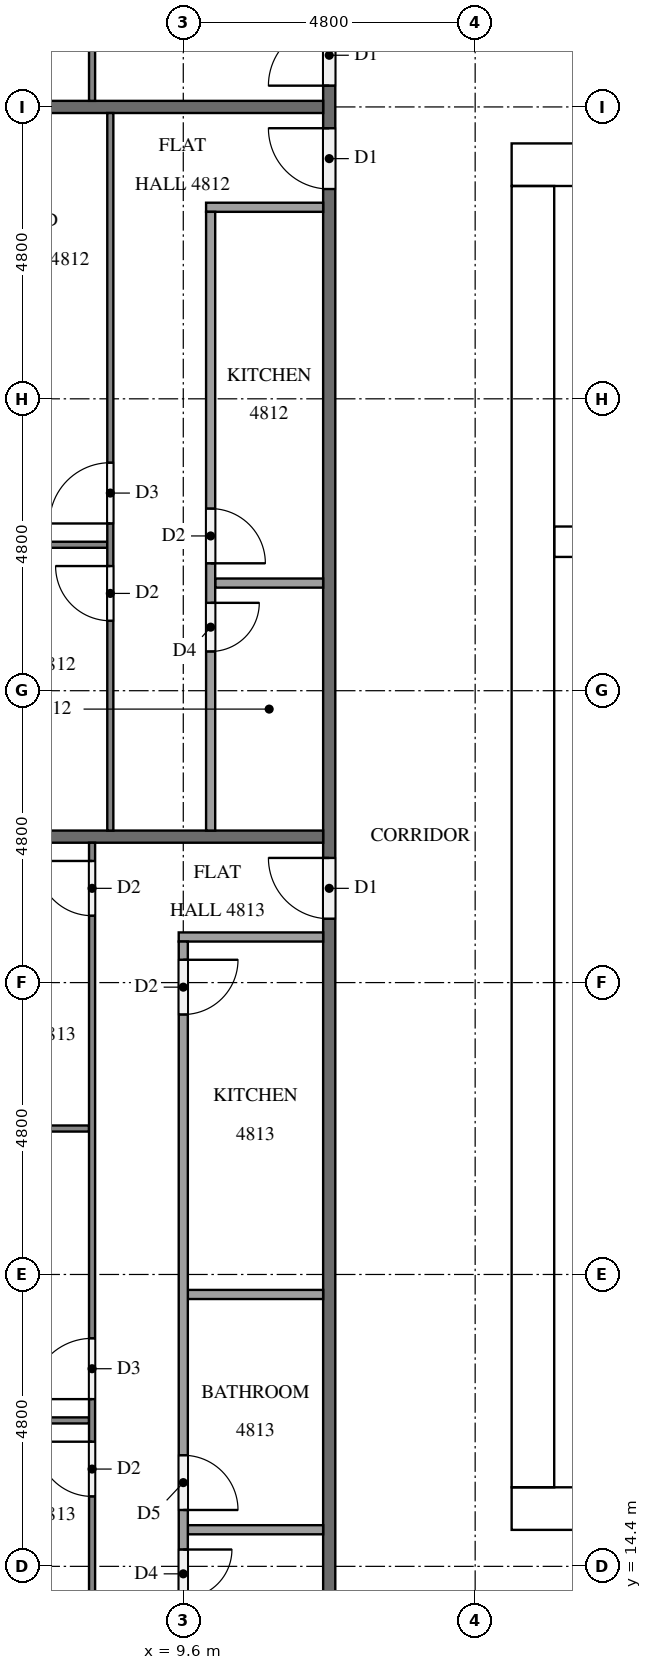
"""IFC4 building model, lengths in metres.
Left out: names, types, materials, properties, quantities, classifications, styles, units other than length and angle.
Written with IfcOpenShell. Run it as: python <this file> out.ifc"""

import sys

from ifc_helpers import new_model, si_unit, direction, frame, frame_2d, origin, place, context, subcontext, project, spatial, rectangle, extrude, element, fill, save


model = new_model("IFC4")
c1 = context("Model", 3, precision=1e-05, world=origin(), true_north=direction((0.0, 1.0)))
c2 = subcontext(c1, "Body", "Model", "MODEL_VIEW")
j1 = project(units=[si_unit("LENGTHUNIT", "METRE"), si_unit("PLANEANGLEUNIT", "RADIAN")], contexts=[c1])
p1 = place(None, origin())
s1 = spatial("IfcSite", under=j1, at=p1, CompositionType="ELEMENT")
p2 = place(p1, origin())
s2 = spatial("IfcBuilding", under=s1, at=p2, CompositionType="ELEMENT")
p3 = place(p2, frame((0.0, 0.0, 185.9)))
s3 = spatial("IfcBuildingStorey", under=s2, at=p3, CompositionType="ELEMENT", Elevation=185.9)
p4 = place(p3, frame((15.0, 15.35, 0.0), z_axis=(0.0, 0.0, 1.0), x_axis=(1.0, 0.0, 0.0)))
e1 = element("IfcWall", 1, at=p4, inside=s3, PredefinedType="SHEAR", context=c2, shape_type="SweptSolid", body=[
    extrude(rectangle(XDim=32.4, YDim=0.7, at=frame_2d((16.2, 0.0))), origin(), (0.0, 0.0, 1.0), 3.2),
])
p5 = place(p4, frame((15.3, 0.0, 0.0)))
e2 = element("IfcOpeningElement", 2, at=p5, cuts=e1, PredefinedType="OPENING", context=c2, shape_type="SweptSolid", body=[
    extrude(rectangle(XDim=1.8, YDim=2.1, at=frame_2d((0.9, 1.05))), frame((0.0, 0.36, 0.0), z_axis=(0.0, -1.0, 0.0), x_axis=(1.0, 0.0, 0.0)), (0.0, 0.0, 1.0), 0.72),
])
p6 = place(p3, frame((15.0, 37.45, 0.0), z_axis=(0.0, 0.0, 1.0), x_axis=(1.0, 0.0, 0.0)))
e3 = element("IfcWall", 3, at=p6, inside=s3, PredefinedType="SHEAR", context=c2, shape_type="SweptSolid", body=[
    extrude(rectangle(XDim=32.4, YDim=0.7, at=frame_2d((16.2, 0.0))), origin(), (0.0, 0.0, 1.0), 3.2),
])
p7 = place(p6, frame((15.3, 0.0, 0.0)))
e4 = element("IfcOpeningElement", 4, at=p7, cuts=e3, PredefinedType="OPENING", context=c2, shape_type="SweptSolid", body=[
    extrude(rectangle(XDim=1.8, YDim=2.1, at=frame_2d((0.9, 1.05))), frame((0.0, 0.36, 0.0), z_axis=(0.0, -1.0, 0.0), x_axis=(1.0, 0.0, 0.0)), (0.0, 0.0, 1.0), 0.72),
])
p8 = place(p6, frame((1.544, 0.0, 0.0)))
e5 = element("IfcOpeningElement", 5, at=p8, cuts=e3, PredefinedType="OPENING", context=c2, shape_type="SweptSolid", body=[
    extrude(rectangle(XDim=1.0, YDim=2.1, at=frame_2d((0.5, 1.05))), frame((0.0, 0.36, 0.0), z_axis=(0.0, -1.0, 0.0), x_axis=(1.0, 0.0, 0.0)), (0.0, 0.0, 1.0), 0.72),
])
p9 = place(p6, frame((5.219, 0.0, 0.0)))
e6 = element("IfcOpeningElement", 6, at=p9, cuts=e3, PredefinedType="OPENING", context=c2, shape_type="SweptSolid", body=[
    extrude(rectangle(XDim=1.0, YDim=2.1, at=frame_2d((0.5, 1.05))), frame((0.0, 0.36, 0.0), z_axis=(0.0, -1.0, 0.0), x_axis=(1.0, 0.0, 0.0)), (0.0, 0.0, 1.0), 0.72),
])
p10 = place(p3, frame((15.35, 15.7, 0.0), z_axis=(0.0, 0.0, 1.0), x_axis=(0.0, 1.0, 0.0)))
e7 = element("IfcWall", 7, at=p10, inside=s3, PredefinedType="SHEAR", context=c2, shape_type="SweptSolid", body=[
    extrude(rectangle(XDim=21.4, YDim=0.7, at=frame_2d((10.7, 0.0))), origin(), (0.0, 0.0, 1.0), 3.2),
])
p11 = place(p10, frame((5.06, 0.0, 0.0)))
e8 = element("IfcOpeningElement", 8, at=p11, cuts=e7, PredefinedType="OPENING", context=c2, shape_type="SweptSolid", body=[
    extrude(rectangle(XDim=1.2, YDim=2.1, at=frame_2d((0.6, 1.05))), frame((0.0, 0.36, 0.0), z_axis=(0.0, -1.0, 0.0), x_axis=(1.0, 0.0, 0.0)), (0.0, 0.0, 1.0), 0.72),
])
p12 = place(p3, frame((15.7, 31.25, 0.0), z_axis=(0.0, 0.0, 1.0), x_axis=(1.0, 0.0, 0.0)))
e9 = element("IfcWall", 9, at=p12, inside=s3, PredefinedType="SHEAR", context=c2, shape_type="SweptSolid", body=[
    extrude(rectangle(XDim=7.15, YDim=0.5, at=frame_2d((3.575, 0.0))), origin(), (0.0, 0.0, 1.0), 3.2),
])
p13 = place(p3, frame((12.0, 12.1, 0.0), z_axis=(0.0, 0.0, 1.0), x_axis=(0.0, 1.0, 0.0)))
e10 = element("IfcWall", 10, at=p13, inside=s3, PredefinedType="PARTITIONING", context=c2, shape_type="SweptSolid", body=[
    extrude(rectangle(XDim=28.6, YDim=0.2, at=frame_2d((14.3, 0.0))), origin(), (0.0, 0.0, 1.0), 3.2),
])
p14 = place(p13, frame((26.65, 0.0, 0.0)))
e11 = element("IfcOpeningElement", 11, at=p14, cuts=e10, PredefinedType="OPENING", context=c2, shape_type="SweptSolid", body=[
    extrude(rectangle(XDim=1.0, YDim=2.1, at=frame_2d((0.5, 1.05))), frame((0.0, 0.11, 0.0), z_axis=(0.0, -1.0, 0.0), x_axis=(1.0, 0.0, 0.0)), (0.0, 0.0, 1.0), 0.22),
])
p15 = place(p13, frame((24.95, 0.0, 0.0)))
e12 = element("IfcOpeningElement", 12, at=p15, cuts=e10, PredefinedType="OPENING", context=c2, shape_type="SweptSolid", body=[
    extrude(rectangle(XDim=1.0, YDim=2.1, at=frame_2d((0.5, 1.05))), frame((0.0, 0.11, 0.0), z_axis=(0.0, -1.0, 0.0), x_axis=(1.0, 0.0, 0.0)), (0.0, 0.0, 1.0), 0.22),
])
p16 = place(p13, frame((12.95, 0.0, 0.0)))
e13 = element("IfcOpeningElement", 13, at=p16, cuts=e10, PredefinedType="OPENING", context=c2, shape_type="SweptSolid", body=[
    extrude(rectangle(XDim=1.0, YDim=2.1, at=frame_2d((0.5, 1.05))), frame((0.0, 0.11, 0.0), z_axis=(0.0, -1.0, 0.0), x_axis=(1.0, 0.0, 0.0)), (0.0, 0.0, 1.0), 0.22),
])
for number, where, z_axis, x_axis in (
    (14, (4.9, 38.4, 0.0), (0.0, 0.0, 1.0), (1.0, 0.0, 0.0)),
    (15, (4.9, 26.4, 0.0), (0.0, 0.0, 1.0), (1.0, 0.0, 0.0)),
):
    element("IfcWall", number, at=place(p3, frame(where, z_axis=z_axis, x_axis=x_axis)), inside=s3, PredefinedType="PARTITIONING", context=c2, shape_type="SweptSolid", body=[
        extrude(rectangle(XDim=7.0, YDim=0.2, at=frame_2d((3.5, 0.0))), origin(), (0.0, 0.0, 1.0), 3.2),
    ])
p17 = place(p3, frame((8.1, 38.5, 0.0), z_axis=(0.0, 0.0, 1.0), x_axis=(0.0, 1.0, 0.0)))
e16 = element("IfcWall", 16, at=p17, inside=s3, PredefinedType="PARTITIONING", context=c2, shape_type="SweptSolid", body=[
    extrude(rectangle(XDim=8.998, YDim=0.1, at=frame_2d((4.499, 0.0))), origin(), (0.0, 0.0, 1.0), 3.2),
])
p18 = place(p17, frame((3.35, 0.0, 0.0)))
e17 = element("IfcOpeningElement", 17, at=p18, cuts=e16, PredefinedType="OPENING", context=c2, shape_type="SweptSolid", body=[
    extrude(rectangle(XDim=1.0, YDim=2.1, at=frame_2d((0.5, 1.05))), frame((0.0, 0.06, 0.0), z_axis=(0.0, -1.0, 0.0), x_axis=(1.0, 0.0, 0.0)), (0.0, 0.0, 1.0), 0.12),
])
p19 = place(p17, frame((5.05, 0.0, 0.0)))
e18 = element("IfcOpeningElement", 18, at=p19, cuts=e16, PredefinedType="OPENING", context=c2, shape_type="SweptSolid", body=[
    extrude(rectangle(XDim=0.9, YDim=2.1, at=frame_2d((0.45, 1.05))), frame((0.0, 0.06, 0.0), z_axis=(0.0, -1.0, 0.0), x_axis=(1.0, 0.0, 0.0)), (0.0, 0.0, 1.0), 0.12),
])
p20 = place(p3, frame((8.35, 31.2, 0.0), z_axis=(0.0, 0.0, 1.0), x_axis=(-1.0, 0.0, 0.0)))
e19 = element("IfcWall", 19, at=p20, inside=s3, PredefinedType="PARTITIONING", context=c2, shape_type="SweptSolid", body=[
    extrude(rectangle(XDim=3.45, YDim=0.1, at=frame_2d((1.725, 0.0))), origin(), (0.0, 0.0, 1.0), 3.2),
])
p21 = place(p3, frame((8.4, 26.5, 0.0), z_axis=(0.0, 0.0, 1.0), x_axis=(0.0, 1.0, 0.0)))
e20 = element("IfcWall", 20, at=p21, inside=s3, PredefinedType="PARTITIONING", context=c2, shape_type="SweptSolid", body=[
    extrude(rectangle(XDim=11.8, YDim=0.1, at=frame_2d((5.9, 0.0))), origin(), (0.0, 0.0, 1.0), 3.2),
])
p22 = place(p21, frame((5.05, 0.0, 0.0)))
e21 = element("IfcOpeningElement", 21, at=p22, cuts=e20, PredefinedType="OPENING", context=c2, shape_type="SweptSolid", body=[
    extrude(rectangle(XDim=1.0, YDim=2.1, at=frame_2d((0.5, 1.05))), frame((0.0, 0.06, 0.0), z_axis=(0.0, -1.0, 0.0), x_axis=(1.0, 0.0, 0.0)), (0.0, 0.0, 1.0), 0.12),
])
p23 = place(p21, frame((3.45, 0.0, 0.0)))
e22 = element("IfcOpeningElement", 22, at=p23, cuts=e20, PredefinedType="OPENING", context=c2, shape_type="SweptSolid", body=[
    extrude(rectangle(XDim=0.9, YDim=2.1, at=frame_2d((0.45, 1.05))), frame((0.0, 0.06, 0.0), z_axis=(0.0, -1.0, 0.0), x_axis=(1.0, 0.0, 0.0)), (0.0, 0.0, 1.0), 0.12),
])
p24 = place(p3, frame((11.9, 30.57, 0.0), z_axis=(0.0, 0.0, 1.0), x_axis=(-1.0, 0.0, 0.0)))
e23 = element("IfcWall", 23, at=p24, inside=s3, PredefinedType="PARTITIONING", context=c2, shape_type="SweptSolid", body=[
    extrude(rectangle(XDim=1.775, YDim=0.15, at=frame_2d((0.887, 0.0))), origin(), (0.0, 0.0, 1.0), 3.2),
])
p25 = place(p3, frame((11.9, 36.75, 0.0), z_axis=(0.0, 0.0, 1.0), x_axis=(-1.0, 0.0, 0.0)))
e24 = element("IfcWall", 24, at=p25, inside=s3, PredefinedType="PARTITIONING", context=c2, shape_type="SweptSolid", body=[
    extrude(rectangle(XDim=1.925, YDim=0.15, at=frame_2d((0.962, 0.0))), origin(), (0.0, 0.0, 1.0), 3.2),
])
p26 = place(p3, frame((10.05, 36.675, 0.0), z_axis=(0.0, 0.0, 1.0), x_axis=(0.0, -1.0, 0.0)))
e25 = element("IfcWall", 25, at=p26, inside=s3, PredefinedType="PARTITIONING", context=c2, shape_type="SweptSolid", body=[
    extrude(rectangle(XDim=10.175, YDim=0.15, at=frame_2d((5.087, 0.0))), origin(), (0.0, 0.0, 1.0), 3.2),
])
p27 = place(p26, frame((4.88, 0.0, 0.0)))
e26 = element("IfcOpeningElement", 26, at=p27, cuts=e25, PredefinedType="OPENING", context=c2, shape_type="SweptSolid", body=[
    extrude(rectangle(XDim=0.9, YDim=2.1, at=frame_2d((0.45, 1.05))), frame((0.0, 0.085, 0.0), z_axis=(0.0, -1.0, 0.0), x_axis=(1.0, 0.0, 0.0)), (0.0, 0.0, 1.0), 0.17),
])
p28 = place(p26, frame((6.43, 0.0, 0.0)))
e27 = element("IfcOpeningElement", 27, at=p28, cuts=e25, PredefinedType="OPENING", context=c2, shape_type="SweptSolid", body=[
    extrude(rectangle(XDim=0.8, YDim=2.1, at=frame_2d((0.4, 1.05))), frame((0.0, 0.085, 0.0), z_axis=(0.0, -1.0, 0.0), x_axis=(1.0, 0.0, 0.0)), (0.0, 0.0, 1.0), 0.17),
])
for number, where, z_axis, x_axis in (
    (28, (8.05, 21.6, 0.0), (0.0, 0.0, 1.0), (-1.0, 0.0, 0.0)),
    (29, (8.05, 16.8, 0.0), (0.0, 0.0, 1.0), (-1.0, 0.0, 0.0)),
):
    element("IfcWall", number, at=place(p3, frame(where, z_axis=z_axis, x_axis=x_axis)), inside=s3, PredefinedType="PARTITIONING", context=c2, shape_type="SweptSolid", body=[
        extrude(rectangle(XDim=3.15, YDim=0.1, at=frame_2d((1.575, 0.0))), origin(), (0.0, 0.0, 1.0), 3.2),
    ])
p29 = place(p3, frame((8.1, 12.1, 0.0), z_axis=(0.0, 0.0, 1.0), x_axis=(0.0, 1.0, 0.0)))
e30 = element("IfcWall", 30, at=p29, inside=s3, PredefinedType="PARTITIONING", context=c2, shape_type="SweptSolid", body=[
    extrude(rectangle(XDim=14.2, YDim=0.1, at=frame_2d((7.1, 0.0))), origin(), (0.0, 0.0, 1.0), 3.2),
])
p30 = place(p29, frame((13.0, 0.0, 0.0)))
e31 = element("IfcOpeningElement", 31, at=p30, cuts=e30, PredefinedType="OPENING", context=c2, shape_type="SweptSolid", body=[
    extrude(rectangle(XDim=0.9, YDim=2.1, at=frame_2d((0.45, 1.05))), frame((0.0, 0.06, 0.0), z_axis=(0.0, -1.0, 0.0), x_axis=(1.0, 0.0, 0.0)), (0.0, 0.0, 1.0), 0.12),
])
p31 = place(p29, frame((5.05, 0.0, 0.0)))
e32 = element("IfcOpeningElement", 32, at=p31, cuts=e30, PredefinedType="OPENING", context=c2, shape_type="SweptSolid", body=[
    extrude(rectangle(XDim=1.0, YDim=2.1, at=frame_2d((0.5, 1.05))), frame((0.0, 0.06, 0.0), z_axis=(0.0, -1.0, 0.0), x_axis=(1.0, 0.0, 0.0)), (0.0, 0.0, 1.0), 0.12),
])
p32 = place(p29, frame((3.45, 0.0, 0.0)))
e33 = element("IfcOpeningElement", 33, at=p32, cuts=e30, PredefinedType="OPENING", context=c2, shape_type="SweptSolid", body=[
    extrude(rectangle(XDim=0.9, YDim=2.1, at=frame_2d((0.45, 1.05))), frame((0.0, 0.06, 0.0), z_axis=(0.0, -1.0, 0.0), x_axis=(1.0, 0.0, 0.0)), (0.0, 0.0, 1.0), 0.12),
])
for number, where, z_axis, x_axis in (
    (34, (11.9, 18.871, 0.0), (0.0, 0.0, 1.0), (-1.0, 0.0, 0.0)),
    (35, (11.9, 15.002, 0.0), (0.0, 0.0, 1.0), (-1.0, 0.0, 0.0)),
):
    element("IfcWall", number, at=place(p3, frame(where, z_axis=z_axis, x_axis=x_axis)), inside=s3, PredefinedType="PARTITIONING", context=c2, shape_type="SweptSolid", body=[
        extrude(rectangle(XDim=2.225, YDim=0.15, at=frame_2d((1.112, 0.0))), origin(), (0.0, 0.0, 1.0), 3.2),
    ])
p33 = place(p3, frame((11.9, 24.75, 0.0), z_axis=(0.0, 0.0, 1.0), x_axis=(-1.0, 0.0, 0.0)))
e36 = element("IfcWall", 36, at=p33, inside=s3, PredefinedType="PARTITIONING", context=c2, shape_type="SweptSolid", body=[
    extrude(rectangle(XDim=2.375, YDim=0.15, at=frame_2d((1.188, 0.0))), origin(), (0.0, 0.0, 1.0), 3.2),
])
p34 = place(p3, frame((9.6, 24.675, 0.0), z_axis=(0.0, 0.0, 1.0), x_axis=(0.0, -1.0, 0.0)))
e37 = element("IfcWall", 37, at=p34, inside=s3, PredefinedType="PARTITIONING", context=c2, shape_type="SweptSolid", body=[
    extrude(rectangle(XDim=12.575, YDim=0.15, at=frame_2d((6.288, 0.0))), origin(), (0.0, 0.0, 1.0), 3.2),
])
p35 = place(p34, frame((0.3, 0.0, 0.0)))
e38 = element("IfcOpeningElement", 38, at=p35, cuts=e37, PredefinedType="OPENING", context=c2, shape_type="SweptSolid", body=[
    extrude(rectangle(XDim=0.9, YDim=2.1, at=frame_2d((0.45, 1.05))), frame((0.0, 0.085, 0.0), z_axis=(0.0, -1.0, 0.0), x_axis=(1.0, 0.0, 0.0)), (0.0, 0.0, 1.0), 0.17),
])
p36 = place(p34, frame((8.448, 0.0, 0.0)))
e39 = element("IfcOpeningElement", 39, at=p36, cuts=e37, PredefinedType="OPENING", context=c2, shape_type="SweptSolid", body=[
    extrude(rectangle(XDim=0.9, YDim=2.1, at=frame_2d((0.45, 1.05))), frame((0.0, 0.085, 0.0), z_axis=(0.0, -1.0, 0.0), x_axis=(1.0, 0.0, 0.0)), (0.0, 0.0, 1.0), 0.17),
])
p37 = place(p34, frame((9.998, 0.0, 0.0)))
e40 = element("IfcOpeningElement", 40, at=p37, cuts=e37, PredefinedType="OPENING", context=c2, shape_type="SweptSolid", body=[
    extrude(rectangle(XDim=0.8, YDim=2.1, at=frame_2d((0.4, 1.05))), frame((0.0, 0.085, 0.0), z_axis=(0.0, -1.0, 0.0), x_axis=(1.0, 0.0, 0.0)), (0.0, 0.0, 1.0), 0.17),
])
p38 = place(p11, frame((1.2, 0.0, 0.0), z_axis=(0.0, 0.0, 1.0), x_axis=(-1.0, 0.0, 0.0)))
e41 = element("IfcDoor", 41, at=p38, inside=s3, OperationType="SINGLE_SWING_LEFT", PredefinedType="DOOR", context=c2, shape_type="SweptSolid", body=[
    extrude(rectangle(XDim=1.2, YDim=2.1, at=frame_2d((0.6, 1.05))), frame((0.0, 0.025, 0.0), z_axis=(0.0, -1.0, 0.0), x_axis=(1.0, 0.0, 0.0)), (0.0, 0.0, 1.0), 0.05),
])
fill(e8, e41)
p39 = place(p14, origin())
e42 = element("IfcDoor", 42, at=p39, inside=s3, OperationType="SINGLE_SWING_LEFT", PredefinedType="DOOR", context=c2, shape_type="SweptSolid", body=[
    extrude(rectangle(XDim=1.0, YDim=2.1, at=frame_2d((0.5, 1.05))), frame((0.0, 0.025, 0.0), z_axis=(0.0, -1.0, 0.0), x_axis=(1.0, 0.0, 0.0)), (0.0, 0.0, 1.0), 0.05),
])
fill(e11, e42)
p40 = place(p15, origin())
e43 = element("IfcDoor", 43, at=p40, inside=s3, OperationType="SINGLE_SWING_RIGHT", PredefinedType="DOOR", context=c2, shape_type="SweptSolid", body=[
    extrude(rectangle(XDim=1.0, YDim=2.1, at=frame_2d((0.5, 1.05))), frame((0.0, 0.025, 0.0), z_axis=(0.0, -1.0, 0.0), x_axis=(1.0, 0.0, 0.0)), (0.0, 0.0, 1.0), 0.05),
])
fill(e12, e43)
p41 = place(p16, origin())
e44 = element("IfcDoor", 44, at=p41, inside=s3, OperationType="SINGLE_SWING_RIGHT", PredefinedType="DOOR", context=c2, shape_type="SweptSolid", body=[
    extrude(rectangle(XDim=1.0, YDim=2.1, at=frame_2d((0.5, 1.05))), frame((0.0, 0.025, 0.0), z_axis=(0.0, -1.0, 0.0), x_axis=(1.0, 0.0, 0.0)), (0.0, 0.0, 1.0), 0.05),
])
fill(e13, e44)
p42 = place(p22, origin())
e45 = element("IfcDoor", 45, at=p42, inside=s3, OperationType="SINGLE_SWING_LEFT", PredefinedType="DOOR", context=c2, shape_type="SweptSolid", body=[
    extrude(rectangle(XDim=1.0, YDim=2.1, at=frame_2d((0.5, 1.05))), frame((0.0, 0.025, 0.0), z_axis=(0.0, -1.0, 0.0), x_axis=(1.0, 0.0, 0.0)), (0.0, 0.0, 1.0), 0.05),
])
fill(e21, e45)
p43 = place(p23, origin())
e46 = element("IfcDoor", 46, at=p43, inside=s3, OperationType="SINGLE_SWING_RIGHT", PredefinedType="DOOR", context=c2, shape_type="SweptSolid", body=[
    extrude(rectangle(XDim=0.9, YDim=2.1, at=frame_2d((0.45, 1.05))), frame((0.0, 0.025, 0.0), z_axis=(0.0, -1.0, 0.0), x_axis=(1.0, 0.0, 0.0)), (0.0, 0.0, 1.0), 0.05),
])
fill(e22, e46)
p44 = place(p27, origin())
e47 = element("IfcDoor", 47, at=p44, inside=s3, OperationType="SINGLE_SWING_RIGHT", PredefinedType="DOOR", context=c2, shape_type="SweptSolid", body=[
    extrude(rectangle(XDim=0.9, YDim=2.1, at=frame_2d((0.45, 1.05))), frame((0.0, 0.025, 0.0), z_axis=(0.0, -1.0, 0.0), x_axis=(1.0, 0.0, 0.0)), (0.0, 0.0, 1.0), 0.05),
])
fill(e26, e47)
p45 = place(p28, origin())
e48 = element("IfcDoor", 48, at=p45, inside=s3, OperationType="SINGLE_SWING_LEFT", PredefinedType="DOOR", context=c2, shape_type="SweptSolid", body=[
    extrude(rectangle(XDim=0.8, YDim=2.1, at=frame_2d((0.4, 1.05))), frame((0.0, 0.025, 0.0), z_axis=(0.0, -1.0, 0.0), x_axis=(1.0, 0.0, 0.0)), (0.0, 0.0, 1.0), 0.05),
])
fill(e27, e48)
p46 = place(p30, origin())
e49 = element("IfcDoor", 49, at=p46, inside=s3, OperationType="SINGLE_SWING_RIGHT", PredefinedType="DOOR", context=c2, shape_type="SweptSolid", body=[
    extrude(rectangle(XDim=0.9, YDim=2.1, at=frame_2d((0.45, 1.05))), frame((0.0, 0.025, 0.0), z_axis=(0.0, -1.0, 0.0), x_axis=(1.0, 0.0, 0.0)), (0.0, 0.0, 1.0), 0.05),
])
fill(e31, e49)
p47 = place(p31, origin())
e50 = element("IfcDoor", 50, at=p47, inside=s3, OperationType="SINGLE_SWING_LEFT", PredefinedType="DOOR", context=c2, shape_type="SweptSolid", body=[
    extrude(rectangle(XDim=1.0, YDim=2.1, at=frame_2d((0.5, 1.05))), frame((0.0, 0.025, 0.0), z_axis=(0.0, -1.0, 0.0), x_axis=(1.0, 0.0, 0.0)), (0.0, 0.0, 1.0), 0.05),
])
fill(e32, e50)
p48 = place(p32, origin())
e51 = element("IfcDoor", 51, at=p48, inside=s3, OperationType="SINGLE_SWING_RIGHT", PredefinedType="DOOR", context=c2, shape_type="SweptSolid", body=[
    extrude(rectangle(XDim=0.9, YDim=2.1, at=frame_2d((0.45, 1.05))), frame((0.0, 0.025, 0.0), z_axis=(0.0, -1.0, 0.0), x_axis=(1.0, 0.0, 0.0)), (0.0, 0.0, 1.0), 0.05),
])
fill(e33, e51)
p49 = place(p35, origin())
e52 = element("IfcDoor", 52, at=p49, inside=s3, OperationType="SINGLE_SWING_LEFT", PredefinedType="DOOR", context=c2, shape_type="SweptSolid", body=[
    extrude(rectangle(XDim=0.9, YDim=2.1, at=frame_2d((0.45, 1.05))), frame((0.0, 0.025, 0.0), z_axis=(0.0, -1.0, 0.0), x_axis=(1.0, 0.0, 0.0)), (0.0, 0.0, 1.0), 0.05),
])
fill(e38, e52)
p50 = place(p36, origin())
e53 = element("IfcDoor", 53, at=p50, inside=s3, OperationType="SINGLE_SWING_RIGHT", PredefinedType="DOOR", context=c2, shape_type="SweptSolid", body=[
    extrude(rectangle(XDim=0.9, YDim=2.1, at=frame_2d((0.45, 1.05))), frame((0.0, 0.025, 0.0), z_axis=(0.0, -1.0, 0.0), x_axis=(1.0, 0.0, 0.0)), (0.0, 0.0, 1.0), 0.05),
])
fill(e39, e53)
p51 = place(p37, origin())
e54 = element("IfcDoor", 54, at=p51, inside=s3, OperationType="SINGLE_SWING_LEFT", PredefinedType="DOOR", context=c2, shape_type="SweptSolid", body=[
    extrude(rectangle(XDim=0.8, YDim=2.1, at=frame_2d((0.4, 1.05))), frame((0.0, 0.025, 0.0), z_axis=(0.0, -1.0, 0.0), x_axis=(1.0, 0.0, 0.0)), (0.0, 0.0, 1.0), 0.05),
])
fill(e40, e54)
save(model, sys.argv[1])
